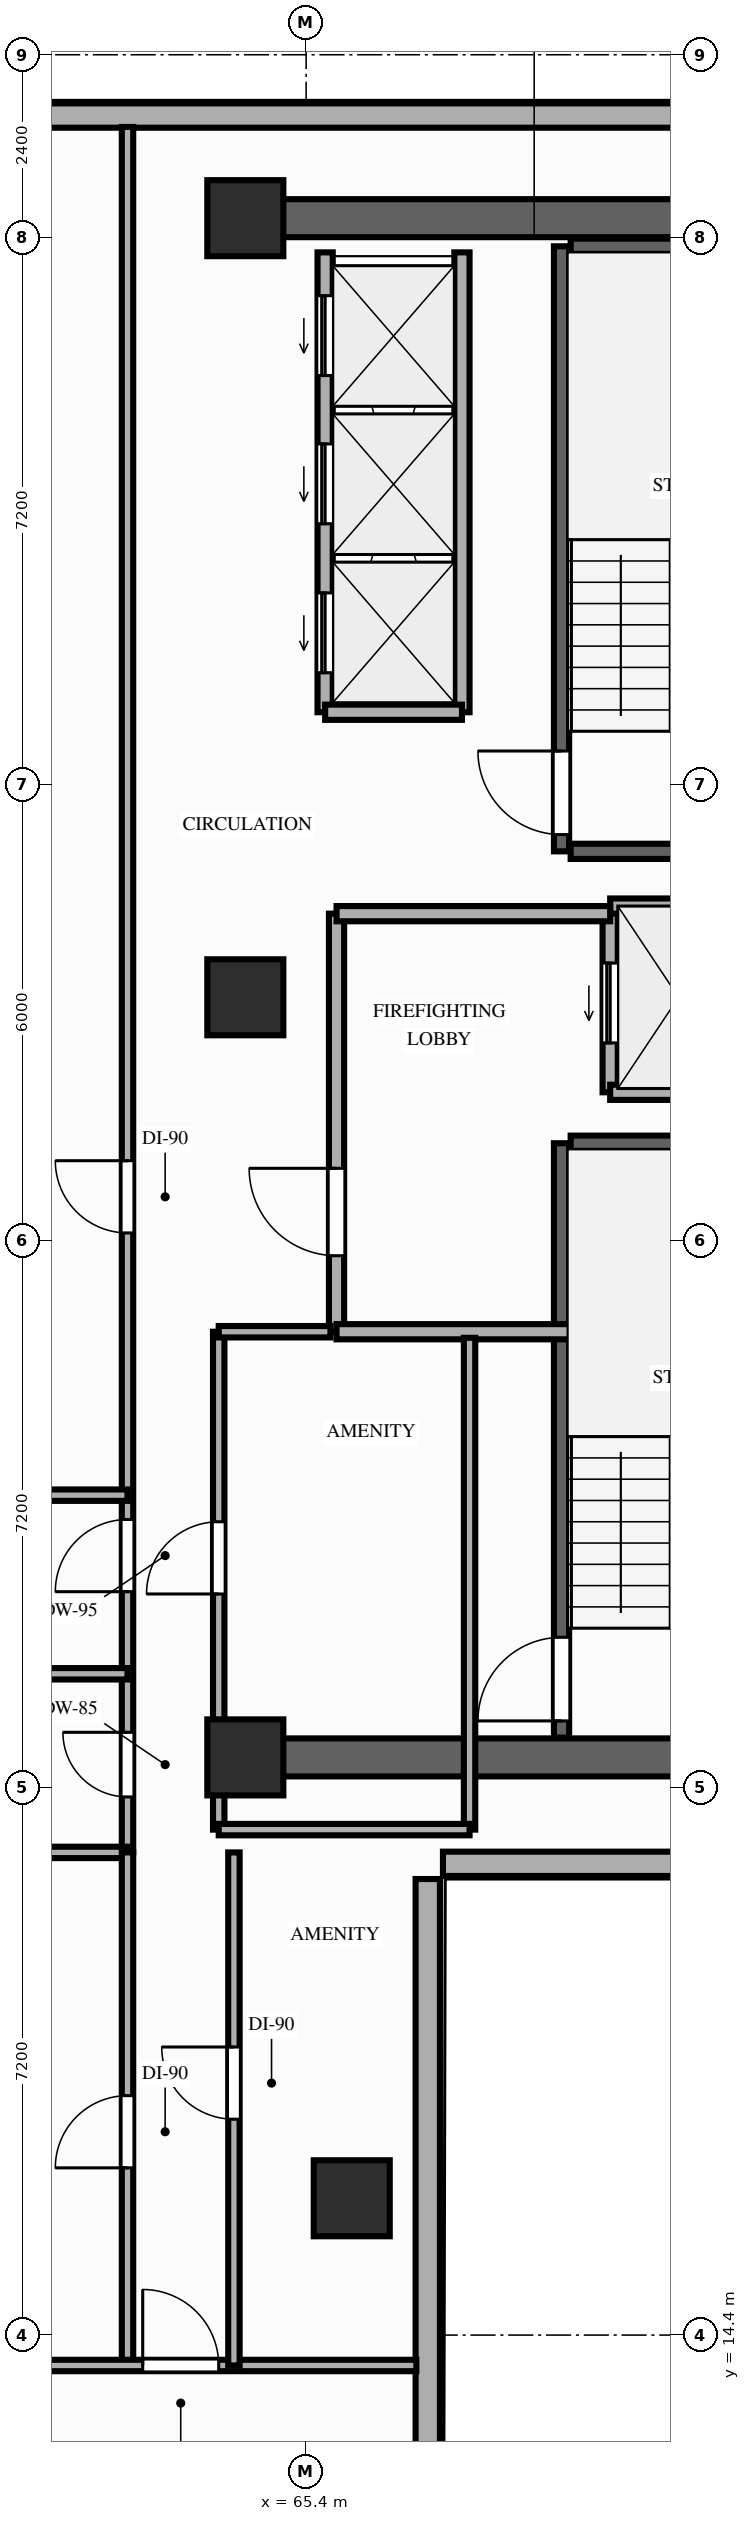
"""IFC4 building model, lengths in metres.
Left out: names, types, materials, properties, quantities, classifications, styles, units other than length and angle.
Written with IfcOpenShell. Run it as: python <this file> out.ifc"""

import sys

from ifc_helpers import new_model, si_unit, direction, frame, frame_2d, origin, origin_2d, place, context, subcontext, project, spatial, rectangle, extrude, element, fill, save


model = new_model("IFC4")
c1 = context("Model", 3, precision=1e-05, world=origin(), true_north=direction((0.0, 1.0)))
c2 = subcontext(c1, "Body", "Model", "MODEL_VIEW")
j1 = project(units=[si_unit("LENGTHUNIT", "METRE"), si_unit("PLANEANGLEUNIT", "RADIAN")], contexts=[c1])
p1 = place(None, origin())
s1 = spatial("IfcSite", under=j1, at=p1, CompositionType="ELEMENT")
p2 = place(p1, origin())
s2 = spatial("IfcBuilding", under=s1, at=p2, CompositionType="ELEMENT")
p3 = place(p2, frame((0.0, 0.0, 43.6)))
s3 = spatial("IfcBuildingStorey", under=s2, at=p3, CompositionType="ELEMENT", Elevation=43.6)
for number, where, z_axis, x_axis in (
    (1, (64.6, 22.0, 0.0), (0.0, 0.0, 1.0), (1.0, 0.0, 0.0)),
    (2, (64.6, 32.0, 0.0), (0.0, 0.0, 1.0), (1.0, 0.0, 0.0)),
    (3, (64.6, 42.25, 0.0), (0.0, 0.0, 1.0), (1.0, 0.0, 0.0)),
    (4, (66.0, 16.2, 0.0), (0.0, 0.0, 1.0), (1.0, 0.0, 0.0)),
):
    element("IfcColumn", number, at=place(p3, frame(where, z_axis=z_axis, x_axis=x_axis)), inside=s3, PredefinedType="COLUMN", context=c2, shape_type="SweptSolid", body=[
        extrude(rectangle(XDim=1.0, YDim=1.0, at=origin_2d()), origin(), (0.0, 0.0, 1.0), 3.2),
    ])
p4 = place(p3, frame((72.8, 43.6, 0.0), z_axis=(0.0, 0.0, 1.0), x_axis=(-1.0, 0.0, 0.0)))
e5 = element("IfcWall", 5, at=p4, inside=s3, PredefinedType="STANDARD", context=c2, shape_type="SweptSolid", body=[
    extrude(rectangle(XDim=14.8, YDim=0.32, at=frame_2d((7.4, 0.0))), origin(), (0.0, 0.0, 1.0), 3.02),
])
p5 = place(p3, frame((67.0, 7.6, 0.0), z_axis=(0.0, 0.0, 1.0), x_axis=(0.0, 1.0, 0.0)))
e6 = element("IfcWall", 6, at=p5, inside=s3, PredefinedType="STANDARD", context=c2, shape_type="SweptSolid", body=[
    extrude(rectangle(XDim=12.8, YDim=0.32, at=frame_2d((6.4, 0.0))), origin(), (0.0, 0.0, 1.0), 3.02),
])
p6 = place(p3, frame((67.2, 20.6, 0.0), z_axis=(0.0, 0.0, 1.0), x_axis=(1.0, 0.0, 0.0)))
e7 = element("IfcWall", 7, at=p6, inside=s3, PredefinedType="STANDARD", context=c2, shape_type="SweptSolid", body=[
    extrude(rectangle(XDim=5.6, YDim=0.32, at=frame_2d((2.8, 0.0))), origin(), (0.0, 0.0, 1.0), 3.02),
])
for number, where, z_axis, x_axis in (
    (8, (64.6, 42.25, 0.0), (0.0, 0.0, 1.0), (1.0, 0.0, 0.0)),
    (9, (64.6, 22.0, 0.0), (0.0, 0.0, 1.0), (1.0, 0.0, 0.0)),
):
    element("IfcWall", number, at=place(p3, frame(where, z_axis=z_axis, x_axis=x_axis)), inside=s3, PredefinedType="SHEAR", context=c2, shape_type="SweptSolid", body=[
        extrude(rectangle(XDim=7.5, YDim=0.5, at=frame_2d((3.75, 0.0))), origin(), (0.0, 0.0, 1.0), 3.02),
    ])
p7 = place(p3, frame((68.76, 22.26, 0.0), z_axis=(0.0, 0.0, 1.0), x_axis=(0.0, 1.0, 0.0)))
e10 = element("IfcWall", 10, at=p7, inside=s3, PredefinedType="SHEAR", context=c2, shape_type="SweptSolid", body=[
    extrude(rectangle(XDim=7.82, YDim=0.2, at=frame_2d((3.91, 0.0))), origin(), (0.0, 0.0, 1.0), 3.02),
])
p8 = place(p7, frame((0.22, 0.0, 0.0)))
e11 = element("IfcOpeningElement", 11, at=p8, cuts=e10, PredefinedType="OPENING", context=c2, shape_type="SweptSolid", body=[
    extrude(rectangle(XDim=1.1, YDim=2.15, at=frame_2d((0.55, 1.075))), frame((0.0, 0.11, 0.0), z_axis=(0.0, -1.0, 0.0), x_axis=(1.0, 0.0, 0.0)), (0.0, 0.0, 1.0), 0.22),
])
p9 = place(p3, frame((68.88, 30.08, 0.0), z_axis=(0.0, 0.0, 1.0), x_axis=(1.0, 0.0, 0.0)))
e12 = element("IfcWall", 12, at=p9, inside=s3, PredefinedType="SHEAR", context=c2, shape_type="SweptSolid", body=[
    extrude(rectangle(XDim=2.88, YDim=0.2, at=frame_2d((1.44, 0.0))), origin(), (0.0, 0.0, 1.0), 3.02),
])
p10 = place(p3, frame((68.76, 33.92, 0.0), z_axis=(0.0, 0.0, 1.0), x_axis=(0.0, 1.0, 0.0)))
e13 = element("IfcWall", 13, at=p10, inside=s3, PredefinedType="SHEAR", context=c2, shape_type="SweptSolid", body=[
    extrude(rectangle(XDim=7.96, YDim=0.2, at=frame_2d((3.98, 0.0))), origin(), (0.0, 0.0, 1.0), 3.02),
])
p11 = place(p10, frame((0.22, 0.0, 0.0)))
e14 = element("IfcOpeningElement", 14, at=p11, cuts=e13, PredefinedType="OPENING", context=c2, shape_type="SweptSolid", body=[
    extrude(rectangle(XDim=1.1, YDim=2.15, at=frame_2d((0.55, 1.075))), frame((0.0, 0.11, 0.0), z_axis=(0.0, -1.0, 0.0), x_axis=(1.0, 0.0, 0.0)), (0.0, 0.0, 1.0), 0.22),
])
for number, where, z_axis, x_axis in (
    (15, (68.88, 41.88, 0.0), (0.0, 0.0, 1.0), (1.0, 0.0, 0.0)),
    (16, (68.88, 33.92, 0.0), (0.0, 0.0, 1.0), (1.0, 0.0, 0.0)),
):
    element("IfcWall", number, at=place(p3, frame(where, z_axis=z_axis, x_axis=x_axis)), inside=s3, PredefinedType="SHEAR", context=c2, shape_type="SweptSolid", body=[
        extrude(rectangle(XDim=2.88, YDim=0.2, at=frame_2d((1.44, 0.0))), origin(), (0.0, 0.0, 1.0), 3.02),
    ])
p12 = place(p3, frame((65.65, 35.75, 0.0), z_axis=(0.0, 0.0, 1.0), x_axis=(0.0, 1.0, 0.0)))
e17 = element("IfcWall", 17, at=p12, inside=s3, PredefinedType="MOVABLE", context=c2, shape_type="SweptSolid", body=[
    extrude(rectangle(XDim=6.05, YDim=0.2, at=frame_2d((3.025, 0.0))), origin(), (0.0, 0.0, 1.0), 3.02),
])
p13 = place(p12, frame((0.52, 0.0, 0.0)))
e18 = element("IfcOpeningElement", 18, at=p13, cuts=e17, PredefinedType="OPENING", context=c2, shape_type="SweptSolid", body=[
    extrude(rectangle(XDim=1.05, YDim=2.15, at=frame_2d((0.525, 1.075))), frame((0.0, 0.11, 0.0), z_axis=(0.0, -1.0, 0.0), x_axis=(1.0, 0.0, 0.0)), (0.0, 0.0, 1.0), 0.22),
])
p14 = place(p12, frame((2.48, 0.0, 0.0)))
e19 = element("IfcOpeningElement", 19, at=p14, cuts=e17, PredefinedType="OPENING", context=c2, shape_type="SweptSolid", body=[
    extrude(rectangle(XDim=1.05, YDim=2.15, at=frame_2d((0.525, 1.075))), frame((0.0, 0.11, 0.0), z_axis=(0.0, -1.0, 0.0), x_axis=(1.0, 0.0, 0.0)), (0.0, 0.0, 1.0), 0.22),
])
p15 = place(p12, frame((4.43, 0.0, 0.0)))
e20 = element("IfcOpeningElement", 20, at=p15, cuts=e17, PredefinedType="OPENING", context=c2, shape_type="SweptSolid", body=[
    extrude(rectangle(XDim=1.05, YDim=2.15, at=frame_2d((0.525, 1.075))), frame((0.0, 0.11, 0.0), z_axis=(0.0, -1.0, 0.0), x_axis=(1.0, 0.0, 0.0)), (0.0, 0.0, 1.0), 0.22),
])
p16 = place(p3, frame((67.45, 35.75, 0.0), z_axis=(0.0, 0.0, 1.0), x_axis=(0.0, 1.0, 0.0)))
e21 = element("IfcWall", 21, at=p16, inside=s3, PredefinedType="MOVABLE", context=c2, shape_type="SweptSolid", body=[
    extrude(rectangle(XDim=6.05, YDim=0.2, at=frame_2d((3.025, 0.0))), origin(), (0.0, 0.0, 1.0), 3.02),
])
p17 = place(p3, frame((65.65, 35.75, 0.0), z_axis=(0.0, 0.0, 1.0), x_axis=(1.0, 0.0, 0.0)))
e22 = element("IfcWall", 22, at=p17, inside=s3, PredefinedType="MOVABLE", context=c2, shape_type="SweptSolid", body=[
    extrude(rectangle(XDim=1.8, YDim=0.2, at=frame_2d((0.9, 0.0))), origin(), (0.0, 0.0, 1.0), 3.02),
])
p18 = place(p3, frame((69.4, 30.75, 0.0), z_axis=(0.0, 0.0, 1.0), x_axis=(0.0, 1.0, 0.0)))
e23 = element("IfcWall", 23, at=p18, inside=s3, PredefinedType="MOVABLE", context=c2, shape_type="SweptSolid", body=[
    extrude(rectangle(XDim=2.45, YDim=0.2, at=frame_2d((1.225, 0.0))), origin(), (0.0, 0.0, 1.0), 3.02),
])
p19 = place(p18, frame((0.65, 0.0, 0.0)))
e24 = element("IfcOpeningElement", 24, at=p19, cuts=e23, PredefinedType="OPENING", context=c2, shape_type="SweptSolid", body=[
    extrude(rectangle(XDim=1.05, YDim=2.15, at=frame_2d((0.525, 1.075))), frame((0.0, 0.11, 0.0), z_axis=(0.0, -1.0, 0.0), x_axis=(1.0, 0.0, 0.0)), (0.0, 0.0, 1.0), 0.22),
])
for number, where, z_axis, x_axis in (
    (25, (69.4, 33.2, 0.0), (0.0, 0.0, 1.0), (1.0, 0.0, 0.0)),
    (26, (69.4, 30.75, 0.0), (0.0, 0.0, 1.0), (1.0, 0.0, 0.0)),
):
    element("IfcWall", number, at=place(p3, frame(where, z_axis=z_axis, x_axis=x_axis)), inside=s3, PredefinedType="MOVABLE", context=c2, shape_type="SweptSolid", body=[
        extrude(rectangle(XDim=1.75, YDim=0.2, at=frame_2d((0.875, 0.0))), origin(), (0.0, 0.0, 1.0), 3.02),
    ])
p20 = place(p3, frame((65.8, 27.6, 0.0), z_axis=(0.0, 0.0, 1.0), x_axis=(0.0, 1.0, 0.0)))
e27 = element("IfcWall", 27, at=p20, inside=s3, PredefinedType="PARTITIONING", context=c2, shape_type="SweptSolid", body=[
    extrude(rectangle(XDim=5.5, YDim=0.2, at=frame_2d((2.75, 0.0))), origin(), (0.0, 0.0, 1.0), 3.02),
])
p21 = place(p20, frame((1.0, 0.0, 0.0)))
e28 = element("IfcOpeningElement", 28, at=p21, cuts=e27, PredefinedType="OPENING", context=c2, shape_type="SweptSolid", body=[
    extrude(rectangle(XDim=1.15, YDim=2.15, at=frame_2d((0.575, 1.075))), frame((0.0, 0.11, 0.0), z_axis=(0.0, -1.0, 0.0), x_axis=(1.0, 0.0, 0.0)), (0.0, 0.0, 1.0), 0.22),
])
p22 = place(p3, frame((65.8, 33.1, 0.0), z_axis=(0.0, 0.0, 1.0), x_axis=(1.0, 0.0, 0.0)))
e29 = element("IfcWall", 29, at=p22, inside=s3, PredefinedType="PARTITIONING", context=c2, shape_type="SweptSolid", body=[
    extrude(rectangle(XDim=3.6, YDim=0.2, at=frame_2d((1.8, 0.0))), origin(), (0.0, 0.0, 1.0), 3.02),
])
p23 = place(p3, frame((65.8, 27.6, 0.0), z_axis=(0.0, 0.0, 1.0), x_axis=(1.0, 0.0, 0.0)))
e30 = element("IfcWall", 30, at=p23, inside=s3, PredefinedType="PARTITIONING", context=c2, shape_type="SweptSolid", body=[
    extrude(rectangle(XDim=3.4, YDim=0.2, at=frame_2d((1.7, 0.0))), origin(), (0.0, 0.0, 1.0), 3.02),
])
p24 = place(p3, frame((64.25, 21.05, 0.0), z_axis=(0.0, 0.0, 1.0), x_axis=(0.0, 1.0, 0.0)))
e31 = element("IfcWall", 31, at=p24, inside=s3, PredefinedType="PARTITIONING", context=c2, shape_type="SweptSolid", body=[
    extrude(rectangle(XDim=6.55, YDim=0.15, at=frame_2d((3.275, 0.0))), origin(), (0.0, 0.0, 1.0), 2.5),
])
p25 = place(p24, frame((3.1, 0.0, 0.0)))
e32 = element("IfcOpeningElement", 32, at=p25, cuts=e31, PredefinedType="OPENING", context=c2, shape_type="SweptSolid", body=[
    extrude(rectangle(XDim=0.95, YDim=2.15, at=frame_2d((0.475, 1.075))), frame((0.0, 0.085, 0.0), z_axis=(0.0, -1.0, 0.0), x_axis=(1.0, 0.0, 0.0)), (0.0, 0.0, 1.0), 0.17),
])
p26 = place(p3, frame((67.55, 21.05, 0.0), z_axis=(0.0, 0.0, 1.0), x_axis=(0.0, 1.0, 0.0)))
e33 = element("IfcWall", 33, at=p26, inside=s3, PredefinedType="PARTITIONING", context=c2, shape_type="SweptSolid", body=[
    extrude(rectangle(XDim=6.47, YDim=0.15, at=frame_2d((3.235, 0.0))), origin(), (0.0, 0.0, 1.0), 2.5),
])
p27 = place(p3, frame((64.25, 21.05, 0.0), z_axis=(0.0, 0.0, 1.0), x_axis=(1.0, 0.0, 0.0)))
e34 = element("IfcWall", 34, at=p27, inside=s3, PredefinedType="PARTITIONING", context=c2, shape_type="SweptSolid", body=[
    extrude(rectangle(XDim=3.3, YDim=0.15, at=frame_2d((1.65, 0.0))), origin(), (0.0, 0.0, 1.0), 2.5),
])
p28 = place(p3, frame((64.25, 27.6, 0.0), z_axis=(0.0, 0.0, 1.0), x_axis=(1.0, 0.0, 0.0)))
e35 = element("IfcWall", 35, at=p28, inside=s3, PredefinedType="PARTITIONING", context=c2, shape_type="SweptSolid", body=[
    extrude(rectangle(XDim=1.47, YDim=0.15, at=frame_2d((0.735, 0.0))), origin(), (0.0, 0.0, 1.0), 2.5),
])
p29 = place(p3, frame((63.05, 20.75, 0.0), z_axis=(0.0, 0.0, 1.0), x_axis=(0.0, 1.0, 0.0)))
e36 = element("IfcWall", 36, at=p29, inside=s3, PredefinedType="PARTITIONING", context=c2, shape_type="SweptSolid", body=[
    extrude(rectangle(XDim=22.7, YDim=0.15, at=frame_2d((11.35, 0.0))), origin(), (0.0, 0.0, 1.0), 2.5),
])
p30 = place(p29, frame((0.73, 0.0, 0.0)))
e37 = element("IfcOpeningElement", 37, at=p30, cuts=e36, PredefinedType="OPENING", context=c2, shape_type="SweptSolid", body=[
    extrude(rectangle(XDim=0.85, YDim=2.1, at=frame_2d((0.425, 1.05))), frame((0.0, 0.085, 0.0), z_axis=(0.0, -1.0, 0.0), x_axis=(1.0, 0.0, 0.0)), (0.0, 0.0, 1.0), 0.17),
])
p31 = place(p29, frame((3.43, 0.0, 0.0)))
e38 = element("IfcOpeningElement", 38, at=p31, cuts=e36, PredefinedType="OPENING", context=c2, shape_type="SweptSolid", body=[
    extrude(rectangle(XDim=0.95, YDim=2.1, at=frame_2d((0.475, 1.05))), frame((0.0, 0.085, 0.0), z_axis=(0.0, -1.0, 0.0), x_axis=(1.0, 0.0, 0.0)), (0.0, 0.0, 1.0), 0.17),
])
p32 = place(p29, frame((8.15, 0.0, 0.0)))
e39 = element("IfcOpeningElement", 39, at=p32, cuts=e36, PredefinedType="OPENING", context=c2, shape_type="SweptSolid", body=[
    extrude(rectangle(XDim=0.95, YDim=2.15, at=frame_2d((0.475, 1.075))), frame((0.0, 0.085, 0.0), z_axis=(0.0, -1.0, 0.0), x_axis=(1.0, 0.0, 0.0)), (0.0, 0.0, 1.0), 0.17),
])
for number, where, z_axis, x_axis in (
    (40, (57.95, 20.75, 0.0), (0.0, 0.0, 1.0), (1.0, 0.0, 0.0)),
    (41, (57.95, 23.1, 0.0), (0.0, 0.0, 1.0), (1.0, 0.0, 0.0)),
    (42, (57.95, 25.45, 0.0), (0.0, 0.0, 1.0), (1.0, 0.0, 0.0)),
):
    element("IfcWall", number, at=place(p3, frame(where, z_axis=z_axis, x_axis=x_axis)), inside=s3, PredefinedType="PARTITIONING", context=c2, shape_type="SweptSolid", body=[
        extrude(rectangle(XDim=5.1, YDim=0.15, at=frame_2d((2.55, 0.0))), origin(), (0.0, 0.0, 1.0), 2.5),
    ])
p33 = place(p3, frame((63.05, 14.0, 0.0), z_axis=(0.0, 0.0, 1.0), x_axis=(0.0, 1.0, 0.0)))
e43 = element("IfcWall", 43, at=p33, inside=s3, PredefinedType="PARTITIONING", context=c2, shape_type="SweptSolid", body=[
    extrude(rectangle(XDim=6.75, YDim=0.15, at=frame_2d((3.375, 0.0))), origin(), (0.0, 0.0, 1.0), 2.5),
])
p34 = place(p33, frame((2.6, 0.0, 0.0)))
e44 = element("IfcOpeningElement", 44, at=p34, cuts=e43, PredefinedType="OPENING", context=c2, shape_type="SweptSolid", body=[
    extrude(rectangle(XDim=0.95, YDim=2.15, at=frame_2d((0.475, 1.075))), frame((0.0, 0.085, 0.0), z_axis=(0.0, -1.0, 0.0), x_axis=(1.0, 0.0, 0.0)), (0.0, 0.0, 1.0), 0.17),
])
p35 = place(p3, frame((55.55, 14.0, 0.0), z_axis=(0.0, 0.0, 1.0), x_axis=(1.0, 0.0, 0.0)))
e45 = element("IfcWall", 45, at=p35, inside=s3, PredefinedType="PARTITIONING", context=c2, shape_type="SweptSolid", body=[
    extrude(rectangle(XDim=11.3, YDim=0.15, at=frame_2d((5.65, 0.0))), origin(), (0.0, 0.0, 1.0), 2.5),
])
p36 = place(p35, frame((7.7, 0.0, 0.0)))
e46 = element("IfcOpeningElement", 46, at=p36, cuts=e45, PredefinedType="OPENING", context=c2, shape_type="SweptSolid", body=[
    extrude(rectangle(XDim=1.0, YDim=2.15, at=frame_2d((0.5, 1.075))), frame((0.0, 0.085, 0.0), z_axis=(0.0, -1.0, 0.0), x_axis=(1.0, 0.0, 0.0)), (0.0, 0.0, 1.0), 0.17),
])
p37 = place(p3, frame((64.45, 14.0, 0.0), z_axis=(0.0, 0.0, 1.0), x_axis=(0.0, 1.0, 0.0)))
e47 = element("IfcWall", 47, at=p37, inside=s3, PredefinedType="PARTITIONING", context=c2, shape_type="SweptSolid", body=[
    extrude(rectangle(XDim=6.75, YDim=0.15, at=frame_2d((3.375, 0.0))), origin(), (0.0, 0.0, 1.0), 2.5),
])
p38 = place(p37, frame((3.24, 0.0, 0.0)))
e48 = element("IfcOpeningElement", 48, at=p38, cuts=e47, PredefinedType="OPENING", context=c2, shape_type="SweptSolid", body=[
    extrude(rectangle(XDim=0.95, YDim=2.15, at=frame_2d((0.475, 1.075))), frame((0.0, 0.085, 0.0), z_axis=(0.0, -1.0, 0.0), x_axis=(1.0, 0.0, 0.0)), (0.0, 0.0, 1.0), 0.17),
])
p39 = place(p8, origin())
e49 = element("IfcDoor", 49, at=p39, inside=s3, OperationType="SINGLE_SWING_LEFT", PredefinedType="DOOR", context=c2, shape_type="SweptSolid", body=[
    extrude(rectangle(XDim=1.1, YDim=2.15, at=frame_2d((0.55, 1.075))), frame((0.0, 0.025, 0.0), z_axis=(0.0, -1.0, 0.0), x_axis=(1.0, 0.0, 0.0)), (0.0, 0.0, 1.0), 0.05),
])
fill(e11, e49)
p40 = place(p11, origin())
e50 = element("IfcDoor", 50, at=p40, inside=s3, OperationType="SINGLE_SWING_RIGHT", PredefinedType="DOOR", context=c2, shape_type="SweptSolid", body=[
    extrude(rectangle(XDim=1.1, YDim=2.15, at=frame_2d((0.55, 1.075))), frame((0.0, 0.025, 0.0), z_axis=(0.0, -1.0, 0.0), x_axis=(1.0, 0.0, 0.0)), (0.0, 0.0, 1.0), 0.05),
])
fill(e14, e50)
p41 = place(p13, origin())
e51 = element("IfcDoor", 51, at=p41, inside=s3, OperationType="SLIDING_TO_LEFT", PredefinedType="DOOR", context=c2, shape_type="SweptSolid", body=[
    extrude(rectangle(XDim=1.05, YDim=2.15, at=frame_2d((0.525, 1.075))), frame((0.0, 0.025, 0.0), z_axis=(0.0, -1.0, 0.0), x_axis=(1.0, 0.0, 0.0)), (0.0, 0.0, 1.0), 0.05),
])
fill(e18, e51)
p42 = place(p14, origin())
e52 = element("IfcDoor", 52, at=p42, inside=s3, OperationType="SLIDING_TO_LEFT", PredefinedType="DOOR", context=c2, shape_type="SweptSolid", body=[
    extrude(rectangle(XDim=1.05, YDim=2.15, at=frame_2d((0.525, 1.075))), frame((0.0, 0.025, 0.0), z_axis=(0.0, -1.0, 0.0), x_axis=(1.0, 0.0, 0.0)), (0.0, 0.0, 1.0), 0.05),
])
fill(e19, e52)
p43 = place(p15, origin())
e53 = element("IfcDoor", 53, at=p43, inside=s3, OperationType="SLIDING_TO_LEFT", PredefinedType="DOOR", context=c2, shape_type="SweptSolid", body=[
    extrude(rectangle(XDim=1.05, YDim=2.15, at=frame_2d((0.525, 1.075))), frame((0.0, 0.025, 0.0), z_axis=(0.0, -1.0, 0.0), x_axis=(1.0, 0.0, 0.0)), (0.0, 0.0, 1.0), 0.05),
])
fill(e20, e53)
p44 = place(p19, origin())
e54 = element("IfcDoor", 54, at=p44, inside=s3, OperationType="SLIDING_TO_LEFT", PredefinedType="DOOR", context=c2, shape_type="SweptSolid", body=[
    extrude(rectangle(XDim=1.05, YDim=2.15, at=frame_2d((0.525, 1.075))), frame((0.0, 0.025, 0.0), z_axis=(0.0, -1.0, 0.0), x_axis=(1.0, 0.0, 0.0)), (0.0, 0.0, 1.0), 0.05),
])
fill(e24, e54)
p45 = place(p21, origin())
e55 = element("IfcDoor", 55, at=p45, inside=s3, OperationType="SINGLE_SWING_RIGHT", PredefinedType="DOOR", context=c2, shape_type="SweptSolid", body=[
    extrude(rectangle(XDim=1.15, YDim=2.15, at=frame_2d((0.575, 1.075))), frame((0.0, 0.025, 0.0), z_axis=(0.0, -1.0, 0.0), x_axis=(1.0, 0.0, 0.0)), (0.0, 0.0, 1.0), 0.05),
])
fill(e28, e55)
p46 = place(p25, origin())
e56 = element("IfcDoor", 56, at=p46, inside=s3, OperationType="SINGLE_SWING_LEFT", PredefinedType="DOOR", context=c2, shape_type="SweptSolid", body=[
    extrude(rectangle(XDim=0.95, YDim=2.15, at=frame_2d((0.475, 1.075))), frame((0.0, 0.025, 0.0), z_axis=(0.0, -1.0, 0.0), x_axis=(1.0, 0.0, 0.0)), (0.0, 0.0, 1.0), 0.05),
])
fill(e32, e56)
p47 = place(p30, origin())
e57 = element("IfcDoor", 57, at=p47, inside=s3, OperationType="SINGLE_SWING_RIGHT", PredefinedType="DOOR", context=c2, shape_type="SweptSolid", body=[
    extrude(rectangle(XDim=0.85, YDim=2.1, at=frame_2d((0.425, 1.05))), frame((0.0, 0.025, 0.0), z_axis=(0.0, -1.0, 0.0), x_axis=(1.0, 0.0, 0.0)), (0.0, 0.0, 1.0), 0.05),
])
fill(e37, e57)
p48 = place(p31, origin())
e58 = element("IfcDoor", 58, at=p48, inside=s3, OperationType="SINGLE_SWING_LEFT", PredefinedType="DOOR", context=c2, shape_type="SweptSolid", body=[
    extrude(rectangle(XDim=0.95, YDim=2.1, at=frame_2d((0.475, 1.05))), frame((0.0, 0.025, 0.0), z_axis=(0.0, -1.0, 0.0), x_axis=(1.0, 0.0, 0.0)), (0.0, 0.0, 1.0), 0.05),
])
fill(e38, e58)
p49 = place(p32, origin())
e59 = element("IfcDoor", 59, at=p49, inside=s3, OperationType="SINGLE_SWING_RIGHT", PredefinedType="DOOR", context=c2, shape_type="SweptSolid", body=[
    extrude(rectangle(XDim=0.95, YDim=2.15, at=frame_2d((0.475, 1.075))), frame((0.0, 0.025, 0.0), z_axis=(0.0, -1.0, 0.0), x_axis=(1.0, 0.0, 0.0)), (0.0, 0.0, 1.0), 0.05),
])
fill(e39, e59)
p50 = place(p34, origin())
e60 = element("IfcDoor", 60, at=p50, inside=s3, OperationType="SINGLE_SWING_LEFT", PredefinedType="DOOR", context=c2, shape_type="SweptSolid", body=[
    extrude(rectangle(XDim=0.95, YDim=2.15, at=frame_2d((0.475, 1.075))), frame((0.0, 0.025, 0.0), z_axis=(0.0, -1.0, 0.0), x_axis=(1.0, 0.0, 0.0)), (0.0, 0.0, 1.0), 0.05),
])
fill(e44, e60)
p51 = place(p38, origin())
e61 = element("IfcDoor", 61, at=p51, inside=s3, OperationType="SINGLE_SWING_RIGHT", PredefinedType="DOOR", context=c2, shape_type="SweptSolid", body=[
    extrude(rectangle(XDim=0.95, YDim=2.15, at=frame_2d((0.475, 1.075))), frame((0.0, 0.025, 0.0), z_axis=(0.0, -1.0, 0.0), x_axis=(1.0, 0.0, 0.0)), (0.0, 0.0, 1.0), 0.05),
])
fill(e48, e61)
p52 = place(p36, origin())
e62 = element("IfcDoor", 62, at=p52, inside=s3, OperationType="SINGLE_SWING_LEFT", PredefinedType="DOOR", context=c2, shape_type="SweptSolid", body=[
    extrude(rectangle(XDim=1.0, YDim=2.15, at=frame_2d((0.5, 1.075))), frame((0.0, 0.025, 0.0), z_axis=(0.0, -1.0, 0.0), x_axis=(1.0, 0.0, 0.0)), (0.0, 0.0, 1.0), 0.05),
])
fill(e46, e62)
save(model, sys.argv[1])
